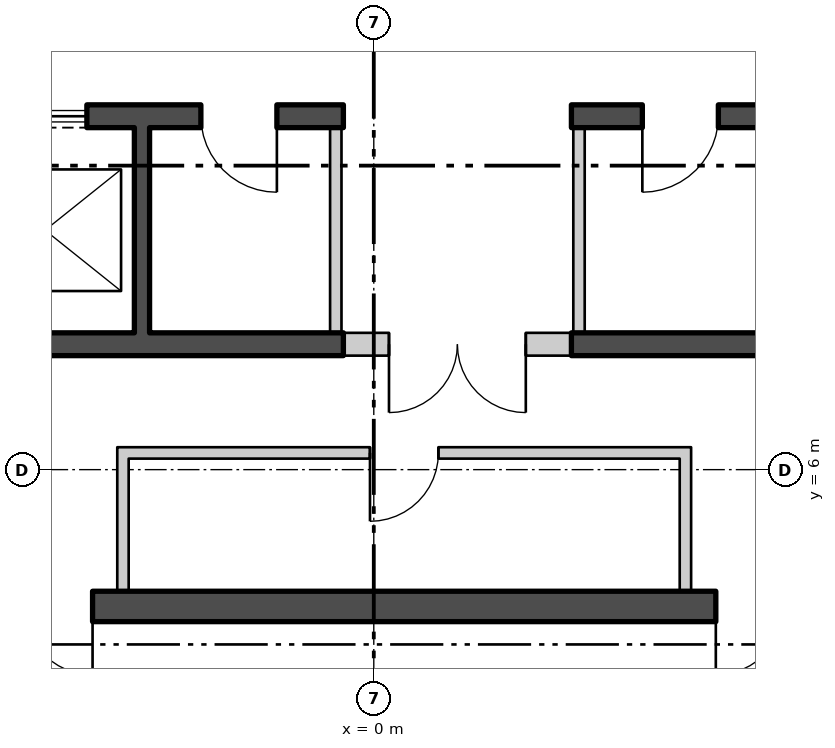
"""IFC4 building model, lengths in metres.
Left out: names, types, materials, properties, quantities, classifications, styles, units other than length and angle.
Written with IfcOpenShell. Run it as: python <this file> out.ifc"""

import sys

from ifc_helpers import new_model, si_unit, direction, frame, frame_2d, origin, place, context, subcontext, project, spatial, polyline, rectangle, outline, extrude, element, fill, save


model = new_model("IFC4")
c1 = context("Model", 3, precision=1e-05, world=origin(), true_north=direction((0.0, 1.0)))
c2 = subcontext(c1, "Body", "Model", "MODEL_VIEW")
j1 = project(units=[si_unit("LENGTHUNIT", "METRE"), si_unit("PLANEANGLEUNIT", "RADIAN")], contexts=[c1])
p1 = place(None, origin())
s1 = spatial("IfcSite", under=j1, at=p1, CompositionType="ELEMENT")
p2 = place(p1, origin())
s2 = spatial("IfcBuilding", under=s1, at=p2, CompositionType="ELEMENT")
p3 = place(p2, frame((0.0, 0.0, 298.2)))
s3 = spatial("IfcBuildingStorey", under=s2, at=p3, CompositionType="ELEMENT", Elevation=298.2)
p4 = place(p3, frame((-25.205, 15.931, -0.28), z_axis=(0.0, 0.0, 1.0), x_axis=(0.499999764979, -0.866025539474, 0.0)))
e1 = element("IfcWall", 1, at=p4, inside=s3, PredefinedType="SOLIDWALL", context=c2, shape_type="SweptSolid", body=[
    extrude(outline(polyline([(-0.13, -0.225), (45.87, -0.225), (45.61, 0.225), (0.13, 0.225), (-0.13, -0.225)])), origin(), (0.0, 0.0, 1.0), 6.1),
])
p5 = place(p4, frame((1.424, 0.0, 1.18)))
e2 = element("IfcOpeningElement", 2, at=p5, cuts=e1, PredefinedType="OPENING", context=c2, shape_type="SweptSolid", body=[
    extrude(rectangle(XDim=2.4, YDim=4.1, at=frame_2d((1.2, 2.05))), frame((0.0, 0.235, 0.0), z_axis=(0.0, -1.0, 0.0), x_axis=(1.0, 0.0, 0.0)), (0.0, 0.0, 1.0), 0.47),
])
p6 = place(p4, frame((5.893, 0.0, 1.18)))
e3 = element("IfcOpeningElement", 3, at=p6, cuts=e1, PredefinedType="OPENING", context=c2, shape_type="SweptSolid", body=[
    extrude(rectangle(XDim=2.4, YDim=4.1, at=frame_2d((1.2, 2.05))), frame((0.0, 0.235, 0.0), z_axis=(0.0, -1.0, 0.0), x_axis=(1.0, 0.0, 0.0)), (0.0, 0.0, 1.0), 0.47),
])
p7 = place(p4, frame((10.401, 0.0, 1.18)))
e4 = element("IfcOpeningElement", 4, at=p7, cuts=e1, PredefinedType="OPENING", context=c2, shape_type="SweptSolid", body=[
    extrude(rectangle(XDim=2.4, YDim=4.1, at=frame_2d((1.2, 2.05))), frame((0.0, 0.235, 0.0), z_axis=(0.0, -1.0, 0.0), x_axis=(1.0, 0.0, 0.0)), (0.0, 0.0, 1.0), 0.47),
])
p8 = place(p4, frame((14.909, 0.0, 1.18)))
e5 = element("IfcOpeningElement", 5, at=p8, cuts=e1, PredefinedType="OPENING", context=c2, shape_type="SweptSolid", body=[
    extrude(rectangle(XDim=2.4, YDim=4.1, at=frame_2d((1.2, 2.05))), frame((0.0, 0.235, 0.0), z_axis=(0.0, -1.0, 0.0), x_axis=(1.0, 0.0, 0.0)), (0.0, 0.0, 1.0), 0.47),
])
p9 = place(p4, frame((19.416, 0.0, 1.18)))
e6 = element("IfcOpeningElement", 6, at=p9, cuts=e1, PredefinedType="OPENING", context=c2, shape_type="SweptSolid", body=[
    extrude(rectangle(XDim=2.4, YDim=4.1, at=frame_2d((1.2, 2.05))), frame((0.0, 0.235, 0.0), z_axis=(0.0, -1.0, 0.0), x_axis=(1.0, 0.0, 0.0)), (0.0, 0.0, 1.0), 0.47),
])
p10 = place(p4, frame((23.924, 0.0, 1.18)))
e7 = element("IfcOpeningElement", 7, at=p10, cuts=e1, PredefinedType="OPENING", context=c2, shape_type="SweptSolid", body=[
    extrude(rectangle(XDim=2.4, YDim=4.1, at=frame_2d((1.2, 2.05))), frame((0.0, 0.235, 0.0), z_axis=(0.0, -1.0, 0.0), x_axis=(1.0, 0.0, 0.0)), (0.0, 0.0, 1.0), 0.47),
])
p11 = place(p4, frame((28.431, 0.0, 1.18)))
e8 = element("IfcOpeningElement", 8, at=p11, cuts=e1, PredefinedType="OPENING", context=c2, shape_type="SweptSolid", body=[
    extrude(rectangle(XDim=2.4, YDim=4.1, at=frame_2d((1.2, 2.05))), frame((0.0, 0.235, 0.0), z_axis=(0.0, -1.0, 0.0), x_axis=(1.0, 0.0, 0.0)), (0.0, 0.0, 1.0), 0.47),
])
p12 = place(p4, frame((32.939, 0.0, 1.18)))
e9 = element("IfcOpeningElement", 9, at=p12, cuts=e1, PredefinedType="OPENING", context=c2, shape_type="SweptSolid", body=[
    extrude(rectangle(XDim=2.4, YDim=4.1, at=frame_2d((1.2, 2.05))), frame((0.0, 0.235, 0.0), z_axis=(0.0, -1.0, 0.0), x_axis=(1.0, 0.0, 0.0)), (0.0, 0.0, 1.0), 0.47),
])
p13 = place(p4, frame((37.447, 0.0, 1.18)))
e10 = element("IfcOpeningElement", 10, at=p13, cuts=e1, PredefinedType="OPENING", context=c2, shape_type="SweptSolid", body=[
    extrude(rectangle(XDim=2.4, YDim=4.1, at=frame_2d((1.2, 2.05))), frame((0.0, 0.235, 0.0), z_axis=(0.0, -1.0, 0.0), x_axis=(1.0, 0.0, 0.0)), (0.0, 0.0, 1.0), 0.47),
])
p14 = place(p4, frame((41.916, 0.0, 1.18)))
e11 = element("IfcOpeningElement", 11, at=p14, cuts=e1, PredefinedType="OPENING", context=c2, shape_type="SweptSolid", body=[
    extrude(rectangle(XDim=2.4, YDim=4.1, at=frame_2d((1.2, 2.05))), frame((0.0, 0.235, 0.0), z_axis=(0.0, -1.0, 0.0), x_axis=(1.0, 0.0, 0.0)), (0.0, 0.0, 1.0), 0.47),
])
p15 = place(p3, frame((2.335, -23.682, -0.28), z_axis=(0.0, 0.0, 1.0), x_axis=(0.499999764979, 0.866025539474, 0.0)))
e12 = element("IfcWall", 12, at=p15, inside=s3, PredefinedType="SOLIDWALL", context=c2, shape_type="SweptSolid", body=[
    extrude(outline(polyline([(-0.13, -0.225), (45.87, -0.225), (45.61, 0.225), (0.13, 0.225), (-0.13, -0.225)])), origin(), (0.0, 0.0, 1.0), 6.1),
])
p16 = place(p15, frame((1.424, 0.0, 1.18)))
e13 = element("IfcOpeningElement", 13, at=p16, cuts=e12, PredefinedType="OPENING", context=c2, shape_type="SweptSolid", body=[
    extrude(rectangle(XDim=2.4, YDim=4.1, at=frame_2d((1.2, 2.05))), frame((0.0, 0.235, 0.0), z_axis=(0.0, -1.0, 0.0), x_axis=(1.0, 0.0, 0.0)), (0.0, 0.0, 1.0), 0.47),
])
p17 = place(p15, frame((5.893, 0.0, 1.18)))
e14 = element("IfcOpeningElement", 14, at=p17, cuts=e12, PredefinedType="OPENING", context=c2, shape_type="SweptSolid", body=[
    extrude(rectangle(XDim=2.4, YDim=4.1, at=frame_2d((1.2, 2.05))), frame((0.0, 0.235, 0.0), z_axis=(0.0, -1.0, 0.0), x_axis=(1.0, 0.0, 0.0)), (0.0, 0.0, 1.0), 0.47),
])
p18 = place(p15, frame((10.401, 0.0, 1.18)))
e15 = element("IfcOpeningElement", 15, at=p18, cuts=e12, PredefinedType="OPENING", context=c2, shape_type="SweptSolid", body=[
    extrude(rectangle(XDim=2.4, YDim=4.1, at=frame_2d((1.2, 2.05))), frame((0.0, 0.235, 0.0), z_axis=(0.0, -1.0, 0.0), x_axis=(1.0, 0.0, 0.0)), (0.0, 0.0, 1.0), 0.47),
])
p19 = place(p15, frame((14.909, 0.0, 1.18)))
e16 = element("IfcOpeningElement", 16, at=p19, cuts=e12, PredefinedType="OPENING", context=c2, shape_type="SweptSolid", body=[
    extrude(rectangle(XDim=2.4, YDim=4.1, at=frame_2d((1.2, 2.05))), frame((0.0, 0.235, 0.0), z_axis=(0.0, -1.0, 0.0), x_axis=(1.0, 0.0, 0.0)), (0.0, 0.0, 1.0), 0.47),
])
p20 = place(p15, frame((19.716, 0.0, 0.28)))
e17 = element("IfcOpeningElement", 17, at=p20, cuts=e12, PredefinedType="OPENING", context=c2, shape_type="SweptSolid", body=[
    extrude(rectangle(XDim=1.8, YDim=2.4, at=frame_2d((0.9, 1.2))), frame((0.0, 0.235, 0.0), z_axis=(0.0, -1.0, 0.0), x_axis=(1.0, 0.0, 0.0)), (0.0, 0.0, 1.0), 0.47),
])
p21 = place(p15, frame((24.224, 0.0, 0.28)))
e18 = element("IfcOpeningElement", 18, at=p21, cuts=e12, PredefinedType="OPENING", context=c2, shape_type="SweptSolid", body=[
    extrude(rectangle(XDim=1.8, YDim=2.4, at=frame_2d((0.9, 1.2))), frame((0.0, 0.235, 0.0), z_axis=(0.0, -1.0, 0.0), x_axis=(1.0, 0.0, 0.0)), (0.0, 0.0, 1.0), 0.47),
])
p22 = place(p15, frame((28.431, 0.0, 1.18)))
e19 = element("IfcOpeningElement", 19, at=p22, cuts=e12, PredefinedType="OPENING", context=c2, shape_type="SweptSolid", body=[
    extrude(rectangle(XDim=2.4, YDim=4.1, at=frame_2d((1.2, 2.05))), frame((0.0, 0.235, 0.0), z_axis=(0.0, -1.0, 0.0), x_axis=(1.0, 0.0, 0.0)), (0.0, 0.0, 1.0), 0.47),
])
p23 = place(p15, frame((32.939, 0.0, 1.18)))
e20 = element("IfcOpeningElement", 20, at=p23, cuts=e12, PredefinedType="OPENING", context=c2, shape_type="SweptSolid", body=[
    extrude(rectangle(XDim=2.4, YDim=4.1, at=frame_2d((1.2, 2.05))), frame((0.0, 0.235, 0.0), z_axis=(0.0, -1.0, 0.0), x_axis=(1.0, 0.0, 0.0)), (0.0, 0.0, 1.0), 0.47),
])
p24 = place(p15, frame((37.447, 0.0, 1.18)))
e21 = element("IfcOpeningElement", 21, at=p24, cuts=e12, PredefinedType="OPENING", context=c2, shape_type="SweptSolid", body=[
    extrude(rectangle(XDim=2.4, YDim=4.1, at=frame_2d((1.2, 2.05))), frame((0.0, 0.235, 0.0), z_axis=(0.0, -1.0, 0.0), x_axis=(1.0, 0.0, 0.0)), (0.0, 0.0, 1.0), 0.47),
])
p25 = place(p15, frame((41.916, 0.0, 1.18)))
e22 = element("IfcOpeningElement", 22, at=p25, cuts=e12, PredefinedType="OPENING", context=c2, shape_type="SweptSolid", body=[
    extrude(rectangle(XDim=2.4, YDim=4.1, at=frame_2d((1.2, 2.05))), frame((0.0, 0.235, 0.0), z_axis=(0.0, -1.0, 0.0), x_axis=(1.0, 0.0, 0.0)), (0.0, 0.0, 1.0), 0.47),
])
p26 = place(p3, frame((-14.5, 4.2, 0.0), z_axis=(0.0, 0.0, 1.0), x_axis=(1.0, 0.0, 0.0)))
e23 = element("IfcWall", 23, at=p26, inside=s3, PredefinedType="SHEAR", context=c2, shape_type="SweptSolid", body=[
    extrude(rectangle(XDim=29.0, YDim=0.4, at=frame_2d((14.5, 0.0))), origin(), (0.0, 0.0, 1.0), 5.8),
])
p27 = place(p26, frame((9.0, 0.0, 0.0)))
e24 = element("IfcOpeningElement", 24, at=p27, cuts=e23, PredefinedType="OPENING", context=c2, shape_type="SweptSolid", body=[
    extrude(rectangle(XDim=1.8, YDim=2.4, at=frame_2d((0.9, 1.2))), frame((0.0, 0.21, 0.0), z_axis=(0.0, -1.0, 0.0), x_axis=(1.0, 0.0, 0.0)), (0.0, 0.0, 1.0), 0.42),
])
p28 = place(p26, frame((19.0, 0.0, 0.0)))
e25 = element("IfcOpeningElement", 25, at=p28, cuts=e23, PredefinedType="OPENING", context=c2, shape_type="SweptSolid", body=[
    extrude(rectangle(XDim=1.8, YDim=2.4, at=frame_2d((0.9, 1.2))), frame((0.0, 0.21, 0.0), z_axis=(0.0, -1.0, 0.0), x_axis=(1.0, 0.0, 0.0)), (0.0, 0.0, 1.0), 0.42),
])
p29 = place(p3, frame((-10.7, 10.65, 0.0), z_axis=(0.0, 0.0, 1.0), x_axis=(1.0, 0.0, 0.0)))
e26 = element("IfcWall", 26, at=p29, inside=s3, PredefinedType="SHEAR", context=c2, shape_type="SweptSolid", body=[
    extrude(rectangle(XDim=10.3, YDim=0.3, at=frame_2d((5.15, 0.0))), origin(), (0.0, 0.0, 1.0), 5.8),
])
p30 = place(p29, frame((0.675, 0.0, 0.0)))
e27 = element("IfcOpeningElement", 27, at=p30, cuts=e26, PredefinedType="OPENING", context=c2, shape_type="SweptSolid", body=[
    extrude(rectangle(XDim=1.1, YDim=2.1, at=frame_2d((0.55, 1.05))), frame((0.0, 0.16, 0.0), z_axis=(0.0, -1.0, 0.0), x_axis=(1.0, 0.0, 0.0)), (0.0, 0.0, 1.0), 0.32),
])
p31 = place(p29, frame((3.275, 0.0, 0.0)))
e28 = element("IfcOpeningElement", 28, at=p31, cuts=e26, PredefinedType="OPENING", context=c2, shape_type="SweptSolid", body=[
    extrude(rectangle(XDim=1.1, YDim=2.1, at=frame_2d((0.55, 1.05))), frame((0.0, 0.16, 0.0), z_axis=(0.0, -1.0, 0.0), x_axis=(1.0, 0.0, 0.0)), (0.0, 0.0, 1.0), 0.32),
])
p32 = place(p29, frame((5.825, 0.0, 0.0)))
e29 = element("IfcOpeningElement", 29, at=p32, cuts=e26, PredefinedType="OPENING", context=c2, shape_type="SweptSolid", body=[
    extrude(rectangle(XDim=1.1, YDim=2.1, at=frame_2d((0.55, 1.05))), frame((0.0, 0.16, 0.0), z_axis=(0.0, -1.0, 0.0), x_axis=(1.0, 0.0, 0.0)), (0.0, 0.0, 1.0), 0.32),
])
p33 = place(p29, frame((8.425, 0.0, 0.0)))
e30 = element("IfcOpeningElement", 30, at=p33, cuts=e26, PredefinedType="OPENING", context=c2, shape_type="SweptSolid", body=[
    extrude(rectangle(XDim=1.0, YDim=2.1, at=frame_2d((0.5, 1.05))), frame((0.0, 0.16, 0.0), z_axis=(0.0, -1.0, 0.0), x_axis=(1.0, 0.0, 0.0)), (0.0, 0.0, 1.0), 0.32),
])
p34 = place(p3, frame((-10.7, 7.65, 0.0), z_axis=(0.0, 0.0, 1.0), x_axis=(1.0, 0.0, 0.0)))
e31 = element("IfcWall", 31, at=p34, inside=s3, PredefinedType="SHEAR", context=c2, shape_type="SweptSolid", body=[
    extrude(rectangle(XDim=10.3, YDim=0.3, at=frame_2d((5.15, 0.0))), origin(), (0.0, 0.0, 1.0), 5.8),
])
p35 = place(p3, frame((2.6, 10.65, 0.0), z_axis=(0.0, 0.0, 1.0), x_axis=(1.0, 0.0, 0.0)))
e32 = element("IfcWall", 32, at=p35, inside=s3, PredefinedType="SHEAR", context=c2, shape_type="SweptSolid", body=[
    extrude(rectangle(XDim=8.1, YDim=0.3, at=frame_2d((4.05, 0.0))), origin(), (0.0, 0.0, 1.0), 5.8),
])
p36 = place(p35, frame((0.933, 0.0, 0.0)))
e33 = element("IfcOpeningElement", 33, at=p36, cuts=e32, PredefinedType="OPENING", context=c2, shape_type="SweptSolid", body=[
    extrude(rectangle(XDim=1.0, YDim=2.1, at=frame_2d((0.5, 1.05))), frame((0.0, 0.16, 0.0), z_axis=(0.0, -1.0, 0.0), x_axis=(1.0, 0.0, 0.0)), (0.0, 0.0, 1.0), 0.32),
])
p37 = place(p35, frame((3.6, 0.0, 0.0)))
e34 = element("IfcOpeningElement", 34, at=p37, cuts=e32, PredefinedType="OPENING", context=c2, shape_type="SweptSolid", body=[
    extrude(rectangle(XDim=1.0, YDim=2.1, at=frame_2d((0.5, 1.05))), frame((0.0, 0.16, 0.0), z_axis=(0.0, -1.0, 0.0), x_axis=(1.0, 0.0, 0.0)), (0.0, 0.0, 1.0), 0.32),
])
p38 = place(p3, frame((2.6, 7.65, 0.0), z_axis=(0.0, 0.0, 1.0), x_axis=(1.0, 0.0, 0.0)))
e35 = element("IfcWall", 35, at=p38, inside=s3, PredefinedType="SHEAR", context=c2, shape_type="SweptSolid", body=[
    extrude(rectangle(XDim=8.1, YDim=0.3, at=frame_2d((4.05, 0.0))), origin(), (0.0, 0.0, 1.0), 5.8),
])
p39 = place(p3, frame((-3.05, 7.8, 0.0), z_axis=(0.0, 0.0, 1.0), x_axis=(0.0, 1.0, 0.0)))
e36 = element("IfcWall", 36, at=p39, inside=s3, PredefinedType="SHEAR", context=c2, shape_type="SweptSolid", body=[
    extrude(rectangle(XDim=2.7, YDim=0.2, at=frame_2d((1.35, 0.0))), origin(), (0.0, 0.0, 1.0), 5.8),
])
for number, where, z_axis, x_axis in (
    (37, (-0.5, 7.8, 0.0), (0.0, 0.0, 1.0), (0.0, 1.0, 0.0)),
    (38, (2.7, 7.8, 0.0), (0.0, 0.0, 1.0), (0.0, 1.0, 0.0)),
):
    element("IfcWall", number, at=place(p3, frame(where, z_axis=z_axis, x_axis=x_axis)), inside=s3, PredefinedType="PARTITIONING", context=c2, shape_type="SweptSolid", body=[
        extrude(rectangle(XDim=2.7, YDim=0.15, at=frame_2d((1.35, 0.0))), origin(), (0.0, 0.0, 1.0), 5.8),
    ])
for number, where, z_axis, x_axis in (
    (39, (-3.3, 4.4, 0.0), (0.0, 0.0, 1.0), (0.0, 1.0, 0.0)),
    (40, (4.1, 4.4, 0.0), (0.0, 0.0, 1.0), (0.0, 1.0, 0.0)),
):
    element("IfcWall", number, at=place(p3, frame(where, z_axis=z_axis, x_axis=x_axis)), inside=s3, PredefinedType="PARTITIONING", context=c2, shape_type="SweptSolid", body=[
        extrude(rectangle(XDim=1.895, YDim=0.15, at=frame_2d((0.948, 0.0))), origin(), (0.0, 0.0, 1.0), 5.8),
    ])
p40 = place(p3, frame((-3.225, 6.22, 0.0), z_axis=(0.0, 0.0, 1.0), x_axis=(1.0, 0.0, 0.0)))
e41 = element("IfcWall", 41, at=p40, inside=s3, PredefinedType="PARTITIONING", context=c2, shape_type="SweptSolid", body=[
    extrude(rectangle(XDim=7.25, YDim=0.15, at=frame_2d((3.625, 0.0))), origin(), (0.0, 0.0, 1.0), 5.8),
])
p41 = place(p40, frame((3.175, 0.0, 0.0)))
e42 = element("IfcOpeningElement", 42, at=p41, cuts=e41, PredefinedType="OPENING", context=c2, shape_type="SweptSolid", body=[
    extrude(rectangle(XDim=0.9, YDim=2.1, at=frame_2d((0.45, 1.05))), frame((0.0, 0.085, 0.0), z_axis=(0.0, -1.0, 0.0), x_axis=(1.0, 0.0, 0.0)), (0.0, 0.0, 1.0), 0.17),
])
p42 = place(p3, frame((-0.4, 7.65, 0.0), z_axis=(0.0, 0.0, 1.0), x_axis=(1.0, 0.0, 0.0)))
e43 = element("IfcWall", 43, at=p42, inside=s3, PredefinedType="PARTITIONING", context=c2, shape_type="SweptSolid", body=[
    extrude(rectangle(XDim=3.0, YDim=0.3, at=frame_2d((1.5, 0.0))), origin(), (0.0, 0.0, 1.0), 5.8),
])
p43 = place(p42, frame((0.6, 0.0, 0.0)))
e44 = element("IfcOpeningElement", 44, at=p43, cuts=e43, PredefinedType="OPENING", context=c2, shape_type="SweptSolid", body=[
    extrude(rectangle(XDim=1.8, YDim=2.4, at=frame_2d((0.9, 1.2))), frame((0.0, 0.16, 0.0), z_axis=(0.0, -1.0, 0.0), x_axis=(1.0, 0.0, 0.0)), (0.0, 0.0, 1.0), 0.32),
])
p44 = place(p32, origin())
e45 = element("IfcDoor", 45, at=p44, inside=s3, OperationType="SLIDING_TO_LEFT", PredefinedType="DOOR", context=c2, shape_type="SweptSolid", body=[
    extrude(rectangle(XDim=1.1, YDim=2.1, at=frame_2d((0.55, 1.05))), frame((0.0, 0.025, 0.0), z_axis=(0.0, -1.0, 0.0), x_axis=(1.0, 0.0, 0.0)), (0.0, 0.0, 1.0), 0.05),
])
fill(e29, e45)
p45 = place(p33, origin())
e46 = element("IfcDoor", 46, at=p45, inside=s3, OperationType="SINGLE_SWING_RIGHT", PredefinedType="DOOR", context=c2, shape_type="SweptSolid", body=[
    extrude(rectangle(XDim=1.0, YDim=2.1, at=frame_2d((0.5, 1.05))), frame((0.0, 0.025, 0.0), z_axis=(0.0, -1.0, 0.0), x_axis=(1.0, 0.0, 0.0)), (0.0, 0.0, 1.0), 0.05),
])
fill(e30, e46)
p46 = place(p36, origin())
e47 = element("IfcDoor", 47, at=p46, inside=s3, OperationType="SINGLE_SWING_LEFT", PredefinedType="DOOR", context=c2, shape_type="SweptSolid", body=[
    extrude(rectangle(XDim=1.0, YDim=2.1, at=frame_2d((0.5, 1.05))), frame((0.0, 0.025, 0.0), z_axis=(0.0, -1.0, 0.0), x_axis=(1.0, 0.0, 0.0)), (0.0, 0.0, 1.0), 0.05),
])
fill(e33, e47)
p47 = place(p41, origin())
e48 = element("IfcDoor", 48, at=p47, inside=s3, OperationType="SINGLE_SWING_LEFT", PredefinedType="DOOR", context=c2, shape_type="SweptSolid", body=[
    extrude(rectangle(XDim=0.9, YDim=2.1, at=frame_2d((0.45, 1.05))), frame((0.0, 0.025, 0.0), z_axis=(0.0, -1.0, 0.0), x_axis=(1.0, 0.0, 0.0)), (0.0, 0.0, 1.0), 0.05),
])
fill(e42, e48)
p48 = place(p43, origin())
e49 = element("IfcDoor", 49, at=p48, inside=s3, OperationType="DOUBLE_DOOR_SINGLE_SWING", PredefinedType="DOOR", context=c2, shape_type="SweptSolid", body=[
    extrude(rectangle(XDim=1.8, YDim=2.4, at=frame_2d((0.9, 1.2))), frame((0.0, 0.025, 0.0), z_axis=(0.0, -1.0, 0.0), x_axis=(1.0, 0.0, 0.0)), (0.0, 0.0, 1.0), 0.05),
])
fill(e44, e49)
p49 = place(p27, origin())
e50 = element("IfcDoor", 50, at=p49, inside=s3, OperationType="DOUBLE_DOOR_SINGLE_SWING", PredefinedType="DOOR", context=c2, shape_type="SweptSolid", body=[
    extrude(rectangle(XDim=1.8, YDim=2.4, at=frame_2d((0.9, 1.2))), frame((0.0, 0.025, 0.0), z_axis=(0.0, -1.0, 0.0), x_axis=(1.0, 0.0, 0.0)), (0.0, 0.0, 1.0), 0.05),
])
fill(e24, e50)
p50 = place(p28, origin())
e51 = element("IfcDoor", 51, at=p50, inside=s3, OperationType="DOUBLE_DOOR_SINGLE_SWING", PredefinedType="DOOR", context=c2, shape_type="SweptSolid", body=[
    extrude(rectangle(XDim=1.8, YDim=2.4, at=frame_2d((0.9, 1.2))), frame((0.0, 0.025, 0.0), z_axis=(0.0, -1.0, 0.0), x_axis=(1.0, 0.0, 0.0)), (0.0, 0.0, 1.0), 0.05),
])
fill(e25, e51)
save(model, sys.argv[1])
